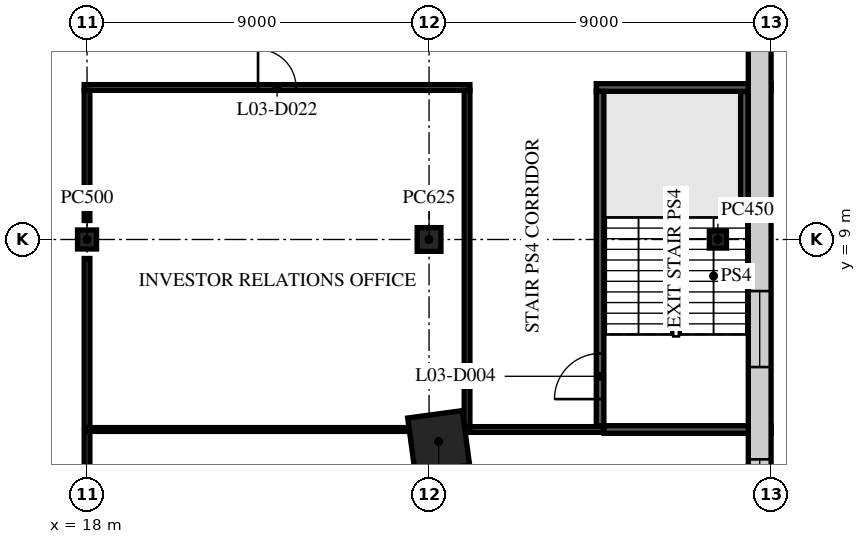
"""IFC4 building model, lengths in metres.
Left out: names, types, materials, properties, quantities, classifications, styles, units other than length and angle.
Written with IfcOpenShell. Run it as: python <this file> out.ifc"""

import sys

from ifc_helpers import new_model, si_unit, direction, frame, frame_2d, origin, origin_2d, place, context, subcontext, project, spatial, rectangle, extrude, element, fill, save


model = new_model("IFC4")
c1 = context("Model", 3, precision=1e-05, world=origin(), true_north=direction((0.0, 1.0)))
c2 = subcontext(c1, "Body", "Model", "MODEL_VIEW")
j1 = project(units=[si_unit("LENGTHUNIT", "METRE"), si_unit("PLANEANGLEUNIT", "RADIAN")], contexts=[c1])
p1 = place(None, origin())
s1 = spatial("IfcSite", under=j1, at=p1, CompositionType="ELEMENT")
p2 = place(p1, origin())
s2 = spatial("IfcBuilding", under=s1, at=p2, CompositionType="ELEMENT")
p3 = place(p2, frame((0.0, 0.0, 13.5)))
s3 = spatial("IfcBuildingStorey", under=s2, at=p3, CompositionType="ELEMENT", Elevation=13.5)
p4 = place(p3, frame((18.0, 9.0, 0.0), z_axis=(0.0, 0.0, 1.0), x_axis=(1.0, 0.0, 0.0)))
e1 = element("IfcColumn", 1, at=p4, inside=s3, PredefinedType="COLUMN", context=c2, shape_type="SweptSolid", body=[
    extrude(rectangle(XDim=0.5, YDim=0.5, at=origin_2d()), origin(), (0.0, 0.0, 1.0), 4.5),
])
p5 = place(p3, frame((27.0, 9.0, 0.0), z_axis=(0.0, 0.0, 1.0), x_axis=(1.0, 0.0, 0.0)))
e2 = element("IfcColumn", 2, at=p5, inside=s3, PredefinedType="COLUMN", context=c2, shape_type="SweptSolid", body=[
    extrude(rectangle(XDim=0.625, YDim=0.625, at=origin_2d()), origin(), (0.0, 0.0, 1.0), 4.5),
])
p6 = place(p3, frame((34.6, 9.0, 0.0), z_axis=(0.0, 0.0, 1.0), x_axis=(1.0, 0.0, 0.0)))
e3 = element("IfcColumn", 3, at=p6, inside=s3, PredefinedType="COLUMN", context=c2, shape_type="SweptSolid", body=[
    extrude(rectangle(XDim=0.45, YDim=0.45, at=origin_2d()), origin(), (0.0, 0.0, 1.0), 4.5),
])
p7 = place(p3, frame((27.253, 3.681, 0.0), z_axis=(0.0, 0.0, 1.0), x_axis=(0.991001197216, 0.133853005627, 0.0)))
e4 = element("IfcColumn", 4, at=p7, inside=s3, PredefinedType="COLUMN", context=c2, shape_type="SweptSolid", body=[
    extrude(rectangle(XDim=1.45, YDim=1.45, at=origin_2d()), origin(), (0.0, 0.0, 1.0), 4.5),
])
p8 = place(p3, frame((18.075, 4.0, 0.0), z_axis=(0.0, 0.0, 1.0), x_axis=(1.0, 0.0, 0.0)))
e5 = element("IfcWall", 5, at=p8, inside=s3, PredefinedType="PARTITIONING", context=c2, shape_type="SweptSolid", body=[
    extrude(rectangle(XDim=8.447, YDim=0.1, at=frame_2d((4.223, 0.0))), origin(), (0.0, 0.0, 1.0), 4.1),
])
p9 = place(p3, frame((28.075, 4.0, 0.0), z_axis=(0.0, 0.0, 1.0), x_axis=(1.0, 0.0, 0.0)))
e6 = element("IfcWall", 6, at=p9, inside=s3, PredefinedType="PARTITIONING", context=c2, shape_type="SweptSolid", body=[
    extrude(rectangle(XDim=3.525, YDim=0.15, at=frame_2d((1.763, 0.0))), origin(), (0.0, 0.0, 1.0), 4.1),
])
p10 = place(p3, frame((31.6, 4.0, 0.0), z_axis=(0.0, 0.0, 1.0), x_axis=(1.0, 0.0, 0.0)))
e7 = element("IfcWall", 7, at=p10, inside=s3, PredefinedType="PARTITIONING", context=c2, shape_type="SweptSolid", body=[
    extrude(rectangle(XDim=4.4, YDim=0.2, at=frame_2d((2.2, 0.0))), origin(), (0.0, 0.0, 1.0), 4.1),
])
p11 = place(p3, frame((17.925, 13.0, 0.0), z_axis=(0.0, 0.0, 1.0), x_axis=(1.0, 0.0, 0.0)))
e8 = element("IfcWall", 8, at=p11, inside=s3, PredefinedType="PARTITIONING", context=c2, shape_type="SweptSolid", body=[
    extrude(rectangle(XDim=10.15, YDim=0.15, at=frame_2d((5.075, 0.0))), origin(), (0.0, 0.0, 1.0), 4.1),
])
p12 = place(p11, frame((4.575, 0.0, 0.0)))
e9 = element("IfcOpeningElement", 9, at=p12, cuts=e8, PredefinedType="OPENING", context=c2, shape_type="SweptSolid", body=[
    extrude(rectangle(XDim=1.0, YDim=2.1, at=frame_2d((0.5, 1.05))), frame((0.0, 0.085, 0.0), z_axis=(0.0, -1.0, 0.0), x_axis=(1.0, 0.0, 0.0)), (0.0, 0.0, 1.0), 0.17),
])
p13 = place(p3, frame((31.4, 13.0, 0.0), z_axis=(0.0, 0.0, 1.0), x_axis=(1.0, 0.0, 0.0)))
e10 = element("IfcWall", 10, at=p13, inside=s3, PredefinedType="PARTITIONING", context=c2, shape_type="SweptSolid", body=[
    extrude(rectangle(XDim=4.6, YDim=0.2, at=frame_2d((2.3, 0.0))), origin(), (0.0, 0.0, 1.0), 4.1),
])
p14 = place(p3, frame((18.0, 0.5, 0.0), z_axis=(0.0, 0.0, 1.0), x_axis=(0.0, 1.0, 0.0)))
e11 = element("IfcWall", 11, at=p14, inside=s3, PredefinedType="PARTITIONING", context=c2, shape_type="SweptSolid", body=[
    extrude(rectangle(XDim=3.45, YDim=0.15, at=frame_2d((1.725, 0.0))), origin(), (0.0, 0.0, 1.0), 4.1),
])
p15 = place(p3, frame((18.0, 4.05, 0.0), z_axis=(0.0, 0.0, 1.0), x_axis=(0.0, 1.0, 0.0)))
e12 = element("IfcWall", 12, at=p15, inside=s3, PredefinedType="PARTITIONING", context=c2, shape_type="SweptSolid", body=[
    extrude(rectangle(XDim=4.45, YDim=0.15, at=frame_2d((2.225, 0.0))), origin(), (0.0, 0.0, 1.0), 4.1),
])
p16 = place(p3, frame((18.0, 9.5, 0.0), z_axis=(0.0, 0.0, 1.0), x_axis=(0.0, 1.0, 0.0)))
e13 = element("IfcWall", 13, at=p16, inside=s3, PredefinedType="PARTITIONING", context=c2, shape_type="SweptSolid", body=[
    extrude(rectangle(XDim=3.425, YDim=0.15, at=frame_2d((1.712, 0.0))), origin(), (0.0, 0.0, 1.0), 4.1),
])
p17 = place(p3, frame((28.0, 4.075, 0.0), z_axis=(0.0, 0.0, 1.0), x_axis=(0.0, 1.0, 0.0)))
e14 = element("IfcWall", 14, at=p17, inside=s3, PredefinedType="PARTITIONING", context=c2, shape_type="SweptSolid", body=[
    extrude(rectangle(XDim=8.85, YDim=0.15, at=frame_2d((4.425, 0.0))), origin(), (0.0, 0.0, 1.0), 4.1),
])
p18 = place(p3, frame((31.5, 4.1, 0.0), z_axis=(0.0, 0.0, 1.0), x_axis=(0.0, 1.0, 0.0)))
e15 = element("IfcWall", 15, at=p18, inside=s3, PredefinedType="PARTITIONING", context=c2, shape_type="SweptSolid", body=[
    extrude(rectangle(XDim=8.8, YDim=0.2, at=frame_2d((4.4, 0.0))), origin(), (0.0, 0.0, 1.0), 4.1),
])
p19 = place(p18, frame((0.7, 0.0, 0.0)))
e16 = element("IfcOpeningElement", 16, at=p19, cuts=e15, PredefinedType="OPENING", context=c2, shape_type="SweptSolid", body=[
    extrude(rectangle(XDim=1.2, YDim=2.1, at=frame_2d((0.6, 1.05))), frame((0.0, 0.11, 0.0), z_axis=(0.0, -1.0, 0.0), x_axis=(1.0, 0.0, 0.0)), (0.0, 0.0, 1.0), 0.22),
])
p20 = place(p3, frame((35.298, 9.581, 0.0), z_axis=(0.0, 0.0, 1.0), x_axis=(0.0, 1.0, 0.0)))
e17 = element("IfcWall", 17, at=p20, inside=s3, PredefinedType="PARTITIONING", context=c2, shape_type="SweptSolid", body=[
    extrude(rectangle(XDim=3.309, YDim=0.2, at=frame_2d((1.655, 0.0))), origin(), (0.0, 0.0, 1.0), 4.1),
])
p21 = place(p3, frame((35.7, -30.876, 0.0), z_axis=(0.0, 0.0, 1.0), x_axis=(0.0, 1.0, 0.0)))
e18 = element("IfcWall", 18, at=p21, inside=s3, PredefinedType="STANDARD", context=c2, shape_type="SweptSolid", body=[
    extrude(rectangle(XDim=61.751, YDim=0.6, at=frame_2d((30.876, 0.0))), origin(), (0.0, 0.0, 1.0), 4.1),
])
p22 = place(p21, frame((1.152, 0.0, 0.9)))
e19 = element("IfcOpeningElement", 19, at=p22, cuts=e18, PredefinedType="OPENING", context=c2, shape_type="SweptSolid", body=[
    extrude(rectangle(XDim=2.0, YDim=3.0, at=frame_2d((1.0, 1.5))), frame((0.0, 0.31, 0.0), z_axis=(0.0, -1.0, 0.0), x_axis=(1.0, 0.0, 0.0)), (0.0, 0.0, 1.0), 0.62),
])
p23 = place(p21, frame((5.519, 0.0, 0.9)))
e20 = element("IfcOpeningElement", 20, at=p23, cuts=e18, PredefinedType="OPENING", context=c2, shape_type="SweptSolid", body=[
    extrude(rectangle(XDim=2.0, YDim=3.0, at=frame_2d((1.0, 1.5))), frame((0.0, 0.31, 0.0), z_axis=(0.0, -1.0, 0.0), x_axis=(1.0, 0.0, 0.0)), (0.0, 0.0, 1.0), 0.62),
])
p24 = place(p21, frame((9.947, 0.0, 0.9)))
e21 = element("IfcOpeningElement", 21, at=p24, cuts=e18, PredefinedType="OPENING", context=c2, shape_type="SweptSolid", body=[
    extrude(rectangle(XDim=2.0, YDim=3.0, at=frame_2d((1.0, 1.5))), frame((0.0, 0.31, 0.0), z_axis=(0.0, -1.0, 0.0), x_axis=(1.0, 0.0, 0.0)), (0.0, 0.0, 1.0), 0.62),
])
p25 = place(p21, frame((14.376, 0.0, 0.9)))
e22 = element("IfcOpeningElement", 22, at=p25, cuts=e18, PredefinedType="OPENING", context=c2, shape_type="SweptSolid", body=[
    extrude(rectangle(XDim=2.0, YDim=3.0, at=frame_2d((1.0, 1.5))), frame((0.0, 0.31, 0.0), z_axis=(0.0, -1.0, 0.0), x_axis=(1.0, 0.0, 0.0)), (0.0, 0.0, 1.0), 0.62),
])
p26 = place(p21, frame((18.804, 0.0, 0.9)))
e23 = element("IfcOpeningElement", 23, at=p26, cuts=e18, PredefinedType="OPENING", context=c2, shape_type="SweptSolid", body=[
    extrude(rectangle(XDim=2.0, YDim=3.0, at=frame_2d((1.0, 1.5))), frame((0.0, 0.31, 0.0), z_axis=(0.0, -1.0, 0.0), x_axis=(1.0, 0.0, 0.0)), (0.0, 0.0, 1.0), 0.62),
])
p27 = place(p21, frame((23.233, 0.0, 0.9)))
e24 = element("IfcOpeningElement", 24, at=p27, cuts=e18, PredefinedType="OPENING", context=c2, shape_type="SweptSolid", body=[
    extrude(rectangle(XDim=2.0, YDim=3.0, at=frame_2d((1.0, 1.5))), frame((0.0, 0.31, 0.0), z_axis=(0.0, -1.0, 0.0), x_axis=(1.0, 0.0, 0.0)), (0.0, 0.0, 1.0), 0.62),
])
p28 = place(p21, frame((27.662, 0.0, 0.9)))
e25 = element("IfcOpeningElement", 25, at=p28, cuts=e18, PredefinedType="OPENING", context=c2, shape_type="SweptSolid", body=[
    extrude(rectangle(XDim=2.0, YDim=3.0, at=frame_2d((1.0, 1.5))), frame((0.0, 0.31, 0.0), z_axis=(0.0, -1.0, 0.0), x_axis=(1.0, 0.0, 0.0)), (0.0, 0.0, 1.0), 0.62),
])
p29 = place(p21, frame((32.09, 0.0, 0.9)))
e26 = element("IfcOpeningElement", 26, at=p29, cuts=e18, PredefinedType="OPENING", context=c2, shape_type="SweptSolid", body=[
    extrude(rectangle(XDim=2.0, YDim=3.0, at=frame_2d((1.0, 1.5))), frame((0.0, 0.31, 0.0), z_axis=(0.0, -1.0, 0.0), x_axis=(1.0, 0.0, 0.0)), (0.0, 0.0, 1.0), 0.62),
])
p30 = place(p21, frame((36.519, 0.0, 0.9)))
e27 = element("IfcOpeningElement", 27, at=p30, cuts=e18, PredefinedType="OPENING", context=c2, shape_type="SweptSolid", body=[
    extrude(rectangle(XDim=2.0, YDim=3.0, at=frame_2d((1.0, 1.5))), frame((0.0, 0.31, 0.0), z_axis=(0.0, -1.0, 0.0), x_axis=(1.0, 0.0, 0.0)), (0.0, 0.0, 1.0), 0.62),
])
p31 = place(p21, frame((45.376, 0.0, 0.9)))
e28 = element("IfcOpeningElement", 28, at=p31, cuts=e18, PredefinedType="OPENING", context=c2, shape_type="SweptSolid", body=[
    extrude(rectangle(XDim=2.0, YDim=3.0, at=frame_2d((1.0, 1.5))), frame((0.0, 0.31, 0.0), z_axis=(0.0, -1.0, 0.0), x_axis=(1.0, 0.0, 0.0)), (0.0, 0.0, 1.0), 0.62),
])
p32 = place(p21, frame((49.804, 0.0, 0.9)))
e29 = element("IfcOpeningElement", 29, at=p32, cuts=e18, PredefinedType="OPENING", context=c2, shape_type="SweptSolid", body=[
    extrude(rectangle(XDim=2.0, YDim=3.0, at=frame_2d((1.0, 1.5))), frame((0.0, 0.31, 0.0), z_axis=(0.0, -1.0, 0.0), x_axis=(1.0, 0.0, 0.0)), (0.0, 0.0, 1.0), 0.62),
])
p33 = place(p21, frame((58.599, 0.0, 0.9)))
e30 = element("IfcOpeningElement", 30, at=p33, cuts=e18, PredefinedType="OPENING", context=c2, shape_type="SweptSolid", body=[
    extrude(rectangle(XDim=2.0, YDim=3.0, at=frame_2d((1.0, 1.5))), frame((0.0, 0.31, 0.0), z_axis=(0.0, -1.0, 0.0), x_axis=(1.0, 0.0, 0.0)), (0.0, 0.0, 1.0), 0.62),
])
p34 = place(p19, frame((1.2, 0.0, 0.0), z_axis=(0.0, 0.0, 1.0), x_axis=(-1.0, 0.0, 0.0)))
e31 = element("IfcDoor", 31, at=p34, inside=s3, OperationType="SINGLE_SWING_RIGHT", PredefinedType="DOOR", context=c2, shape_type="SweptSolid", body=[
    extrude(rectangle(XDim=1.2, YDim=2.1, at=frame_2d((0.6, 1.05))), frame((0.0, 0.025, 0.0), z_axis=(0.0, -1.0, 0.0), x_axis=(1.0, 0.0, 0.0)), (0.0, 0.0, 1.0), 0.05),
])
fill(e16, e31)
p35 = place(p12, origin())
e32 = element("IfcDoor", 32, at=p35, inside=s3, OperationType="SINGLE_SWING_RIGHT", PredefinedType="DOOR", context=c2, shape_type="SweptSolid", body=[
    extrude(rectangle(XDim=1.0, YDim=2.1, at=frame_2d((0.5, 1.05))), frame((0.0, 0.025, 0.0), z_axis=(0.0, -1.0, 0.0), x_axis=(1.0, 0.0, 0.0)), (0.0, 0.0, 1.0), 0.05),
])
fill(e9, e32)
p36 = place(p29, origin())
e33 = element("IfcWindow", 33, at=p36, inside=s3, PartitioningType="SINGLE_PANEL", PredefinedType="WINDOW", context=c2, shape_type="SweptSolid", body=[
    extrude(rectangle(XDim=2.0, YDim=3.0, at=frame_2d((1.0, 1.5))), frame((0.0, 0.03, 0.0), z_axis=(0.0, -1.0, 0.0), x_axis=(1.0, 0.0, 0.0)), (0.0, 0.0, 1.0), 0.06),
])
fill(e26, e33)
p37 = place(p30, origin())
e34 = element("IfcWindow", 34, at=p37, inside=s3, PartitioningType="SINGLE_PANEL", PredefinedType="WINDOW", context=c2, shape_type="SweptSolid", body=[
    extrude(rectangle(XDim=2.0, YDim=3.0, at=frame_2d((1.0, 1.5))), frame((0.0, 0.03, 0.0), z_axis=(0.0, -1.0, 0.0), x_axis=(1.0, 0.0, 0.0)), (0.0, 0.0, 1.0), 0.06),
])
fill(e27, e34)
save(model, sys.argv[1])
